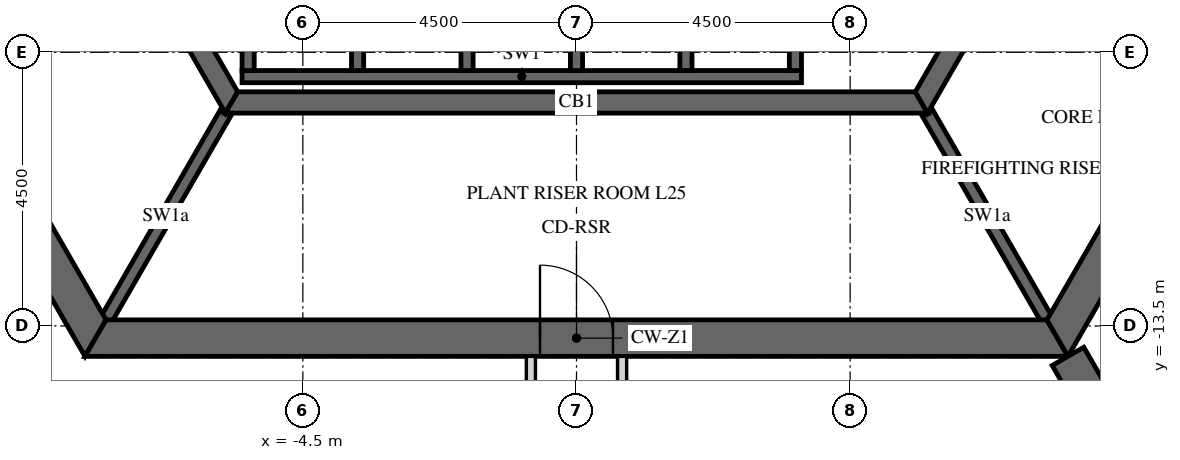
"""IFC4 building model, lengths in metres.
Left out: names, types, materials, properties, quantities, classifications, styles, units other than length and angle.
Written with IfcOpenShell. Run it as: python <this file> out.ifc"""

import sys

from ifc_helpers import new_model, si_unit, direction, frame, frame_2d, origin, place, context, subcontext, project, spatial, polyline, rectangle, outline, extrude, element, fill, save


model = new_model("IFC4")
c1 = context("Model", 3, precision=1e-05, world=origin(), true_north=direction((0.0, 1.0)))
c2 = subcontext(c1, "Body", "Model", "MODEL_VIEW")
j1 = project(units=[si_unit("LENGTHUNIT", "METRE"), si_unit("PLANEANGLEUNIT", "RADIAN")], contexts=[c1])
p1 = place(None, origin())
s1 = spatial("IfcSite", under=j1, at=p1, CompositionType="ELEMENT")
p2 = place(p1, origin())
s2 = spatial("IfcBuilding", under=s1, at=p2, CompositionType="ELEMENT")
p3 = place(p2, frame((0.0, 0.0, 111.6)))
s3 = spatial("IfcBuildingStorey", under=s2, at=p3, CompositionType="ELEMENT", Elevation=111.6)
p4 = place(p3, frame((-15.819, 0.0, -0.15), z_axis=(0.0, 0.0, 1.0), x_axis=(0.499999880136, -0.866025472988, 0.0)))
e1 = element("IfcWall", 1, at=p4, inside=s3, PredefinedType="SHEAR", context=c2, shape_type="SweptSolid", body=[
    extrude(outline(polyline([(-0.173, -0.3), (15.993, -0.3), (15.646, 0.3), (0.173, 0.3), (-0.173, -0.3)])), origin(), (0.0, 0.0, 1.0), 3.9),
])
p5 = place(p4, frame((6.981, 0.0, 0.15)))
e2 = element("IfcOpeningElement", 2, at=p5, cuts=e1, PredefinedType="OPENING", context=c2, shape_type="SweptSolid", body=[
    extrude(rectangle(XDim=1.8, YDim=2.4, at=frame_2d((0.9, 1.2))), frame((0.0, 0.31, 0.0), z_axis=(0.0, -1.0, 0.0), x_axis=(1.0, 0.0, 0.0)), (0.0, 0.0, 1.0), 0.62),
])
p6 = place(p3, frame((-7.91, -13.7, -0.15), z_axis=(0.0, 0.0, 1.0), x_axis=(1.0, 0.0, 0.0)))
e3 = element("IfcWall", 3, at=p6, inside=s3, PredefinedType="SHEAR", context=c2, shape_type="SweptSolid", body=[
    extrude(outline(polyline([(-0.173, -0.3), (15.993, -0.3), (15.646, 0.3), (0.173, 0.3), (-0.173, -0.3)])), origin(), (0.0, 0.0, 1.0), 3.9),
])
p7 = place(p6, frame((7.31, 0.0, 0.15)))
e4 = element("IfcOpeningElement", 4, at=p7, cuts=e3, PredefinedType="OPENING", context=c2, shape_type="SweptSolid", body=[
    extrude(rectangle(XDim=1.2, YDim=2.4, at=frame_2d((0.6, 1.2))), frame((0.0, 0.31, 0.0), z_axis=(0.0, -1.0, 0.0), x_axis=(1.0, 0.0, 0.0)), (0.0, 0.0, 1.0), 0.62),
])
p8 = place(p3, frame((7.91, -13.7, -0.15), z_axis=(0.0, 0.0, 1.0), x_axis=(0.499999880136, 0.866025472988, 0.0)))
e5 = element("IfcWall", 5, at=p8, inside=s3, PredefinedType="SHEAR", context=c2, shape_type="SweptSolid", body=[
    extrude(outline(polyline([(-0.173, -0.3), (15.993, -0.3), (15.646, 0.3), (0.173, 0.3), (-0.173, -0.3)])), origin(), (0.0, 0.0, 1.0), 3.9),
])
p9 = place(p8, frame((7.039, 0.0, 0.15)))
e6 = element("IfcOpeningElement", 6, at=p9, cuts=e5, PredefinedType="OPENING", context=c2, shape_type="SweptSolid", body=[
    extrude(rectangle(XDim=1.8, YDim=2.4, at=frame_2d((0.9, 1.2))), frame((0.0, 0.31, 0.0), z_axis=(0.0, -1.0, 0.0), x_axis=(1.0, 0.0, 0.0)), (0.0, 0.0, 1.0), 0.62),
])
p10 = place(p3, frame((8.083, -14.0, -0.15), z_axis=(0.0, 0.0, 1.0), x_axis=(0.499997680643, -0.866026742862, 0.0)))
e7 = element("IfcWall", 7, at=p10, inside=s3, PredefinedType="SHEAR", context=c2, shape_type="SweptSolid", body=[
    extrude(rectangle(XDim=16.509, YDim=0.6, at=frame_2d((8.254, 0.0))), origin(), (0.0, 0.0, 1.0), 3.9),
])
p11 = place(p10, frame((7.354, 0.0, 0.15)))
e8 = element("IfcOpeningElement", 8, at=p11, cuts=e7, PredefinedType="OPENING", context=c2, shape_type="SweptSolid", body=[
    extrude(rectangle(XDim=1.8, YDim=2.4, at=frame_2d((0.9, 1.2))), frame((0.0, 0.31, 0.0), z_axis=(0.0, -1.0, 0.0), x_axis=(1.0, 0.0, 0.0)), (0.0, 0.0, 1.0), 0.62),
])
p12 = place(p3, frame((-11.345, 0.0, -0.15), z_axis=(0.0, 0.0, 1.0), x_axis=(0.499995046907, -0.866028263435, 0.0)))
e9 = element("IfcWall", 9, at=p12, inside=s3, PredefinedType="SHEAR", context=c2, shape_type="SweptSolid", body=[
    extrude(outline(polyline([(-0.101, -0.175), (11.446, -0.175), (11.244, 0.175), (0.101, 0.175), (-0.101, -0.175)])), origin(), (0.0, 0.0, 1.0), 3.9),
])
p13 = place(p12, frame((4.744, 0.0, 0.15)))
e10 = element("IfcOpeningElement", 10, at=p13, cuts=e9, PredefinedType="OPENING", context=c2, shape_type="SweptSolid", body=[
    extrude(rectangle(XDim=1.8, YDim=2.4, at=frame_2d((0.9, 1.2))), frame((0.0, 0.185, 0.0), z_axis=(0.0, -1.0, 0.0), x_axis=(1.0, 0.0, 0.0)), (0.0, 0.0, 1.0), 0.37),
])
p14 = place(p3, frame((-5.673, -9.825, -0.15), z_axis=(0.0, 0.0, 1.0), x_axis=(1.0, 0.0, 0.0)))
e11 = element("IfcWall", 11, at=p14, inside=s3, PredefinedType="SHEAR", context=c2, shape_type="SweptSolid", body=[
    extrude(outline(polyline([(-0.101, -0.175), (11.446, -0.175), (11.244, 0.175), (0.101, 0.175), (-0.101, -0.175)])), origin(), (0.0, 0.0, 1.0), 3.9),
])
p15 = place(p3, frame((5.673, -9.825, -0.15), z_axis=(0.0, 0.0, 1.0), x_axis=(0.499995046907, 0.866028263435, 0.0)))
e12 = element("IfcWall", 12, at=p15, inside=s3, PredefinedType="SHEAR", context=c2, shape_type="SweptSolid", body=[
    extrude(outline(polyline([(-0.101, -0.175), (11.446, -0.175), (11.244, 0.175), (0.101, 0.175), (-0.101, -0.175)])), origin(), (0.0, 0.0, 1.0), 3.9),
])
p16 = place(p15, frame((4.801, 0.0, 0.15)))
e13 = element("IfcOpeningElement", 13, at=p16, cuts=e12, PredefinedType="OPENING", context=c2, shape_type="SweptSolid", body=[
    extrude(rectangle(XDim=1.8, YDim=2.4, at=frame_2d((0.9, 1.2))), frame((0.0, 0.185, 0.0), z_axis=(0.0, -1.0, 0.0), x_axis=(1.0, 0.0, 0.0)), (0.0, 0.0, 1.0), 0.37),
])
p17 = place(p3, frame((-5.5, -9.4, -0.25), z_axis=(0.0, 0.0, 1.0), x_axis=(1.0, 0.0, 0.0)))
e14 = element("IfcWall", 14, at=p17, inside=s3, PredefinedType="SHEAR", context=c2, shape_type="SweptSolid", body=[
    extrude(rectangle(XDim=9.2, YDim=0.2, at=frame_2d((4.6, 0.0))), origin(), (0.0, 0.0, 1.0), 3.9),
])
for number, where, z_axis, x_axis in (
    (15, (-5.4, -9.3, -0.25), (0.0, 0.0, 1.0), (0.0, 1.0, 0.0)),
    (16, (-3.6, -9.3, -0.25), (0.0, 0.0, 1.0), (0.0, 1.0, 0.0)),
    (17, (-1.8, -9.3, -0.25), (0.0, 0.0, 1.0), (0.0, 1.0, 0.0)),
    (18, (0.0, -9.3, -0.25), (0.0, 0.0, 1.0), (0.0, 1.0, 0.0)),
    (19, (1.8, -9.3, -0.25), (0.0, 0.0, 1.0), (0.0, 1.0, 0.0)),
    (20, (3.6, -9.3, -0.25), (0.0, 0.0, 1.0), (0.0, 1.0, 0.0)),
):
    element("IfcWall", number, at=place(p3, frame(where, z_axis=z_axis, x_axis=x_axis)), inside=s3, PredefinedType="SHEAR", context=c2, shape_type="SweptSolid", body=[
        extrude(rectangle(XDim=2.9, YDim=0.2, at=frame_2d((1.45, 0.0))), origin(), (0.0, 0.0, 1.0), 3.9),
    ])
for number, where, z_axis, x_axis in (
    (21, (-5.773, -10.0, -0.15), (0.0, 0.0, 1.0), (-0.5, -0.866, 0.0)),
    (22, (5.773, -10.0, -0.15), (0.0, 0.0, 1.0), (0.5, -0.866, 0.0)),
):
    element("IfcWall", number, at=place(p3, frame(where, z_axis=z_axis, x_axis=x_axis)), inside=s3, PredefinedType="SHEAR", context=c2, shape_type="SweptSolid", body=[
        extrude(rectangle(XDim=3.926, YDim=0.2, at=frame_2d((1.963, 0.0))), origin(), (0.0, 0.0, 1.0), 3.9),
    ])
p18 = place(p3, frame((-0.75, -14.0, 0.0), z_axis=(0.0, 0.0, 1.0), x_axis=(0.0, -1.0, 0.0)))
e23 = element("IfcWall", 23, at=p18, inside=s3, PredefinedType="PARTITIONING", context=c2, shape_type="SweptSolid", body=[
    extrude(rectangle(XDim=6.252, YDim=0.15, at=frame_2d((3.126, 0.0))), origin(), (0.0, 0.0, 1.0), 2.988),
])
p19 = place(p3, frame((0.75, -20.072, 0.0), z_axis=(0.0, 0.0, 1.0), x_axis=(0.0, 1.0, 0.0)))
e24 = element("IfcWall", 24, at=p19, inside=s3, PredefinedType="PARTITIONING", context=c2, shape_type="SweptSolid", body=[
    extrude(rectangle(XDim=6.072, YDim=0.15, at=frame_2d((3.036, 0.0))), origin(), (0.0, 0.0, 1.0), 2.988),
])
p20 = place(p7, origin())
e25 = element("IfcDoor", 25, at=p20, inside=s3, OperationType="SINGLE_SWING_LEFT", PredefinedType="DOOR", context=c2, shape_type="SweptSolid", body=[
    extrude(rectangle(XDim=1.2, YDim=2.4, at=frame_2d((0.6, 1.2))), frame((0.0, 0.025, 0.0), z_axis=(0.0, -1.0, 0.0), x_axis=(1.0, 0.0, 0.0)), (0.0, 0.0, 1.0), 0.05),
])
fill(e4, e25)
save(model, sys.argv[1])
